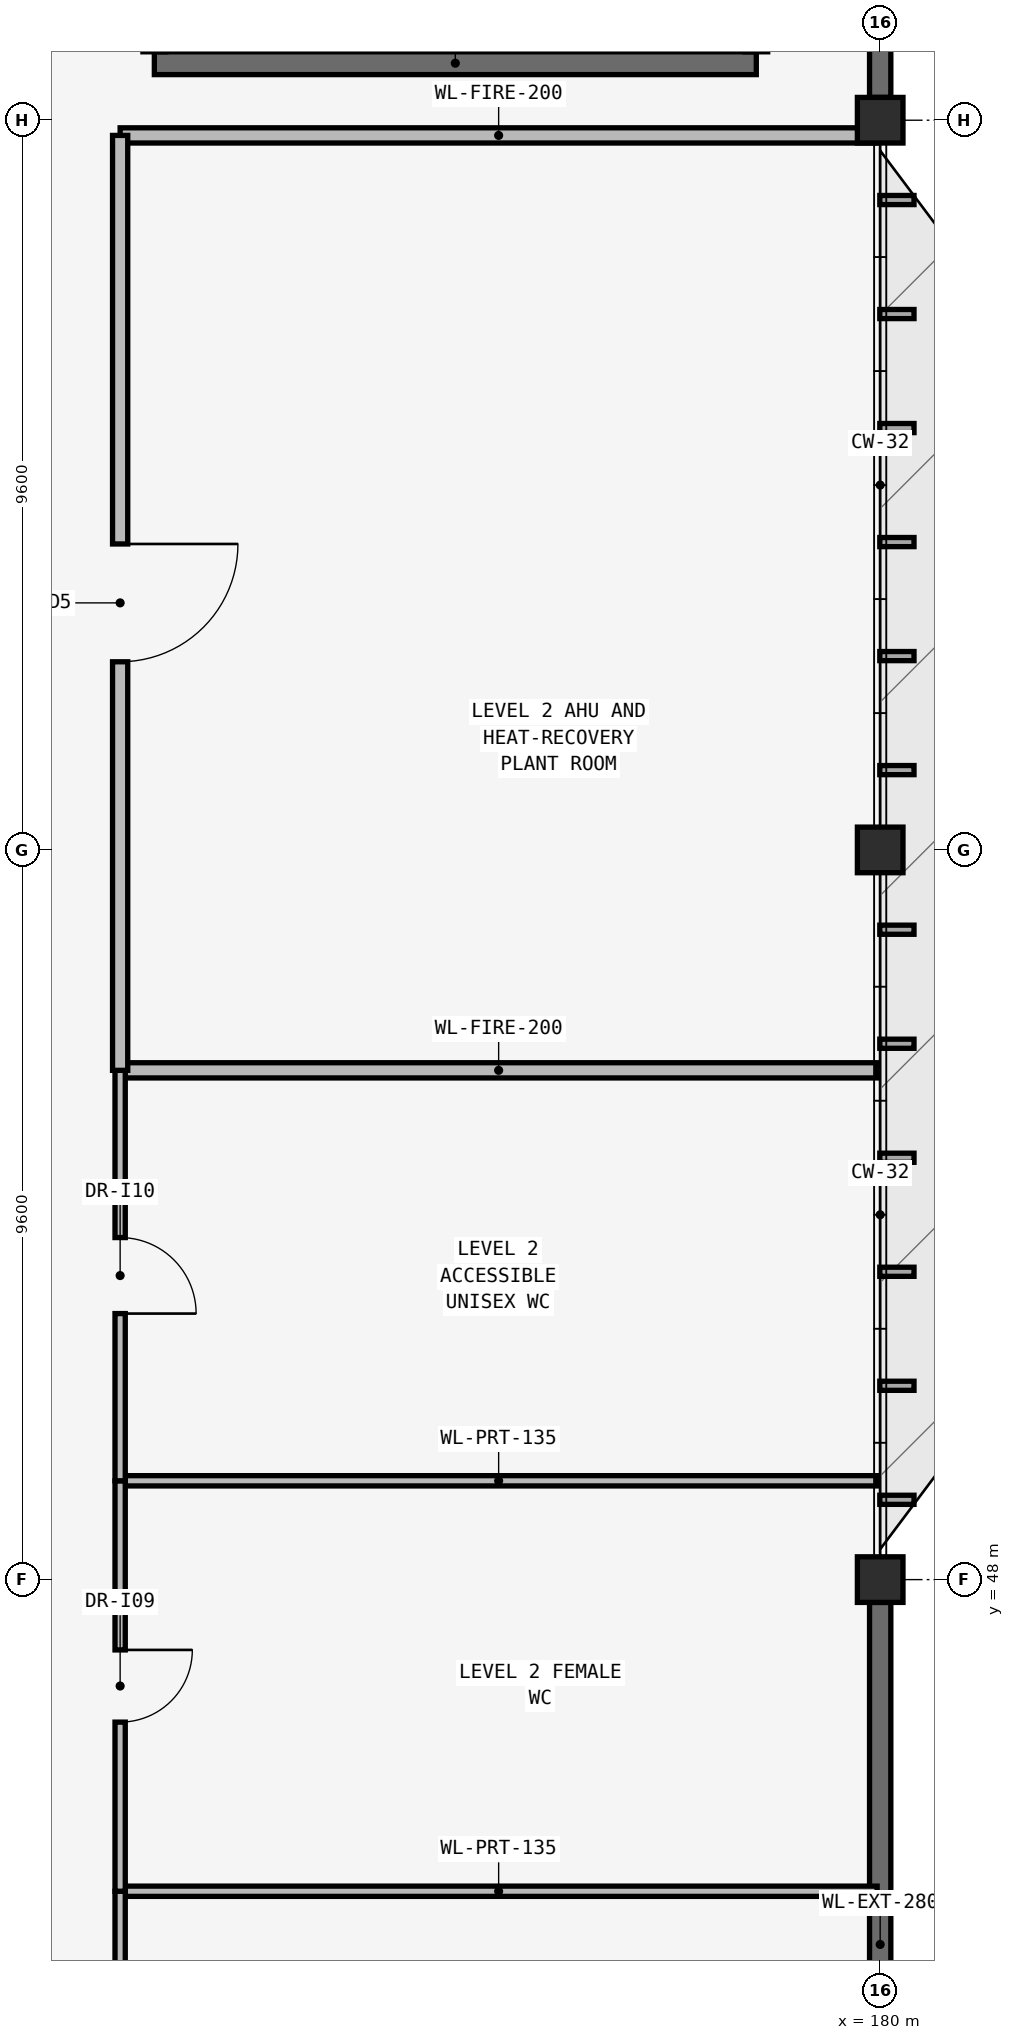
"""IFC4 building model, lengths in metres.
Left out: names, types, materials, properties, quantities, classifications, styles, units other than length and angle.
Written with IfcOpenShell. Run it as: python <this file> out.ifc"""

import sys

from ifc_helpers import new_model, si_unit, direction, frame, frame_2d, origin, origin_2d, place, context, subcontext, project, spatial, rectangle, extrude, element, fill, save


model = new_model("IFC4")
c1 = context("Model", 3, precision=1e-05, world=origin(), true_north=direction((0.0, 1.0)))
c2 = subcontext(c1, "Body", "Model", "MODEL_VIEW")
j1 = project(units=[si_unit("LENGTHUNIT", "METRE"), si_unit("PLANEANGLEUNIT", "RADIAN")], contexts=[c1])
p1 = place(None, origin())
s1 = spatial("IfcSite", under=j1, at=p1, CompositionType="ELEMENT")
p2 = place(p1, origin())
s2 = spatial("IfcBuilding", under=s1, at=p2, CompositionType="ELEMENT")
p3 = place(p2, frame((0.0, 0.0, 10.2)))
s3 = spatial("IfcBuildingStorey", under=s2, at=p3, CompositionType="ELEMENT", Elevation=10.2)
for number, where, z_axis, x_axis in (
    (1, (180.0, 48.0, 0.0), (0.0, 0.0, 1.0), (1.0, 0.0, 0.0)),
    (2, (180.0, 57.6, 0.0), (0.0, 0.0, 1.0), (1.0, 0.0, 0.0)),
    (3, (180.0, 67.2, 0.0), (0.0, 0.0, 1.0), (1.0, 0.0, 0.0)),
):
    element("IfcColumn", number, at=place(p3, frame(where, z_axis=z_axis, x_axis=x_axis)), inside=s3, PredefinedType="COLUMN", context=c2, shape_type="SweptSolid", body=[
        extrude(rectangle(XDim=0.6, YDim=0.6, at=origin_2d()), origin(), (0.0, 0.0, 1.0), 4.2),
    ])
for number, where, z_axis, x_axis in (
    (4, (180.0, 38.7, 0.0), (0.0, 0.0, 1.0), (0.0, 1.0, 0.0)),
    (5, (180.0, 67.5, 0.0), (0.0, 0.0, 1.0), (0.0, 1.0, 0.0)),
):
    element("IfcWall", number, at=place(p3, frame(where, z_axis=z_axis, x_axis=x_axis)), inside=s3, PredefinedType="SOLIDWALL", context=c2, shape_type="SweptSolid", body=[
        extrude(rectangle(XDim=9.0, YDim=0.28, at=frame_2d((4.5, 0.0))), origin(), (0.0, 0.0, 1.0), 3.9),
    ])
p4 = place(p3, frame((170.45, 67.95, 0.0), z_axis=(0.0, 0.0, 1.0), x_axis=(1.0, 0.0, 0.0)))
e6 = element("IfcWall", 6, at=p4, inside=s3, PredefinedType="SHEAR", context=c2, shape_type="SweptSolid", body=[
    extrude(rectangle(XDim=7.92, YDim=0.3, at=frame_2d((3.96, 0.0))), origin(), (0.0, 0.0, 1.0), 3.94),
])
for number, where, z_axis, x_axis in (
    (7, (170.0, 43.9, 0.0), (0.0, 0.0, 1.0), (1.0, 0.0, 0.0)),
    (8, (170.0, 49.3, 0.0), (0.0, 0.0, 1.0), (1.0, 0.0, 0.0)),
):
    element("IfcWall", number, at=place(p3, frame(where, z_axis=z_axis, x_axis=x_axis)), inside=s3, PredefinedType="PARTITIONING", context=c2, shape_type="SweptSolid", body=[
        extrude(rectangle(XDim=9.96, YDim=0.135, at=frame_2d((4.98, 0.0))), origin(), (0.0, 0.0, 1.0), 3.94),
    ])
p5 = place(p3, frame((170.0, 54.7, 0.0), z_axis=(0.0, 0.0, 1.0), x_axis=(1.0, 0.0, 0.0)))
e9 = element("IfcWall", 9, at=p5, inside=s3, PredefinedType="SOLIDWALL", context=c2, shape_type="SweptSolid", body=[
    extrude(rectangle(XDim=9.96, YDim=0.2, at=frame_2d((4.98, 0.0))), origin(), (0.0, 0.0, 1.0), 3.94),
])
p6 = place(p3, frame((170.0, 67.0, 0.0), z_axis=(0.0, 0.0, 1.0), x_axis=(1.0, 0.0, 0.0)))
e10 = element("IfcWall", 10, at=p6, inside=s3, PredefinedType="SOLIDWALL", context=c2, shape_type="SweptSolid", body=[
    extrude(rectangle(XDim=9.96, YDim=0.2, at=frame_2d((4.98, 0.0))), origin(), (0.0, 0.0, 1.0), 3.488),
])
p7 = place(p3, frame((170.0, 38.65, 0.0), z_axis=(0.0, 0.0, 1.0), x_axis=(0.0, 1.0, 0.0)))
e11 = element("IfcWall", 11, at=p7, inside=s3, PredefinedType="PARTITIONING", context=c2, shape_type="SweptSolid", body=[
    extrude(rectangle(XDim=5.25, YDim=0.135, at=frame_2d((2.625, 0.0))), origin(), (0.0, 0.0, 1.0), 3.94),
])
p8 = place(p7, frame((2.15, 0.0, 0.0)))
e12 = element("IfcOpeningElement", 12, at=p8, cuts=e11, PredefinedType="OPENING", context=c2, shape_type="SweptSolid", body=[
    extrude(rectangle(XDim=0.95, YDim=2.1, at=frame_2d((0.475, 1.05))), frame((0.0, 0.083, 0.0), z_axis=(0.0, -1.0, 0.0), x_axis=(1.0, 0.0, 0.0)), (0.0, 0.0, 1.0), 0.165),
])
p9 = place(p3, frame((170.0, 43.9, 0.0), z_axis=(0.0, 0.0, 1.0), x_axis=(0.0, 1.0, 0.0)))
e13 = element("IfcWall", 13, at=p9, inside=s3, PredefinedType="PARTITIONING", context=c2, shape_type="SweptSolid", body=[
    extrude(rectangle(XDim=5.4, YDim=0.135, at=frame_2d((2.7, 0.0))), origin(), (0.0, 0.0, 1.0), 3.94),
])
p10 = place(p9, frame((2.225, 0.0, 0.0)))
e14 = element("IfcOpeningElement", 14, at=p10, cuts=e13, PredefinedType="OPENING", context=c2, shape_type="SweptSolid", body=[
    extrude(rectangle(XDim=0.95, YDim=2.1, at=frame_2d((0.475, 1.05))), frame((0.0, 0.083, 0.0), z_axis=(0.0, -1.0, 0.0), x_axis=(1.0, 0.0, 0.0)), (0.0, 0.0, 1.0), 0.165),
])
p11 = place(p3, frame((170.0, 49.3, 0.0), z_axis=(0.0, 0.0, 1.0), x_axis=(0.0, 1.0, 0.0)))
e15 = element("IfcWall", 15, at=p11, inside=s3, PredefinedType="PARTITIONING", context=c2, shape_type="SweptSolid", body=[
    extrude(rectangle(XDim=5.4, YDim=0.135, at=frame_2d((2.7, 0.0))), origin(), (0.0, 0.0, 1.0), 3.94),
])
p12 = place(p11, frame((2.2, 0.0, 0.0)))
e16 = element("IfcOpeningElement", 16, at=p12, cuts=e15, PredefinedType="OPENING", context=c2, shape_type="SweptSolid", body=[
    extrude(rectangle(XDim=1.0, YDim=2.1, at=frame_2d((0.5, 1.05))), frame((0.0, 0.083, 0.0), z_axis=(0.0, -1.0, 0.0), x_axis=(1.0, 0.0, 0.0)), (0.0, 0.0, 1.0), 0.165),
])
p13 = place(p3, frame((170.0, 54.7, 0.0), z_axis=(0.0, 0.0, 1.0), x_axis=(0.0, 1.0, 0.0)))
e17 = element("IfcWall", 17, at=p13, inside=s3, PredefinedType="SOLIDWALL", context=c2, shape_type="SweptSolid", body=[
    extrude(rectangle(XDim=12.3, YDim=0.2, at=frame_2d((6.15, 0.0))), origin(), (0.0, 0.0, 1.0), 3.94),
])
p14 = place(p13, frame((5.375, 0.0, 0.0)))
e18 = element("IfcOpeningElement", 18, at=p14, cuts=e17, PredefinedType="OPENING", context=c2, shape_type="SweptSolid", body=[
    extrude(rectangle(XDim=1.55, YDim=2.25, at=frame_2d((0.775, 1.125))), frame((0.0, 0.115, 0.0), z_axis=(0.0, -1.0, 0.0), x_axis=(1.0, 0.0, 0.0)), (0.0, 0.0, 1.0), 0.23),
])
p15 = place(p10, origin())
e19 = element("IfcDoor", 19, at=p15, inside=s3, OperationType="SINGLE_SWING_RIGHT", PredefinedType="DOOR", context=c2, shape_type="SweptSolid", body=[
    extrude(rectangle(XDim=0.95, YDim=2.1, at=frame_2d((0.475, 1.05))), frame((0.0, 0.025, 0.0), z_axis=(0.0, -1.0, 0.0), x_axis=(1.0, 0.0, 0.0)), (0.0, 0.0, 1.0), 0.05),
])
fill(e14, e19)
p16 = place(p12, origin())
e20 = element("IfcDoor", 20, at=p16, inside=s3, OperationType="SINGLE_SWING_LEFT", PredefinedType="DOOR", context=c2, shape_type="SweptSolid", body=[
    extrude(rectangle(XDim=1.0, YDim=2.1, at=frame_2d((0.5, 1.05))), frame((0.0, 0.025, 0.0), z_axis=(0.0, -1.0, 0.0), x_axis=(1.0, 0.0, 0.0)), (0.0, 0.0, 1.0), 0.05),
])
fill(e16, e20)
p17 = place(p14, origin())
e21 = element("IfcDoor", 21, at=p17, inside=s3, OperationType="SINGLE_SWING_RIGHT", PredefinedType="DOOR", context=c2, shape_type="SweptSolid", body=[
    extrude(rectangle(XDim=1.55, YDim=2.25, at=frame_2d((0.775, 1.125))), frame((0.0, 0.025, 0.0), z_axis=(0.0, -1.0, 0.0), x_axis=(1.0, 0.0, 0.0)), (0.0, 0.0, 1.0), 0.05),
])
fill(e18, e21)
save(model, sys.argv[1])
